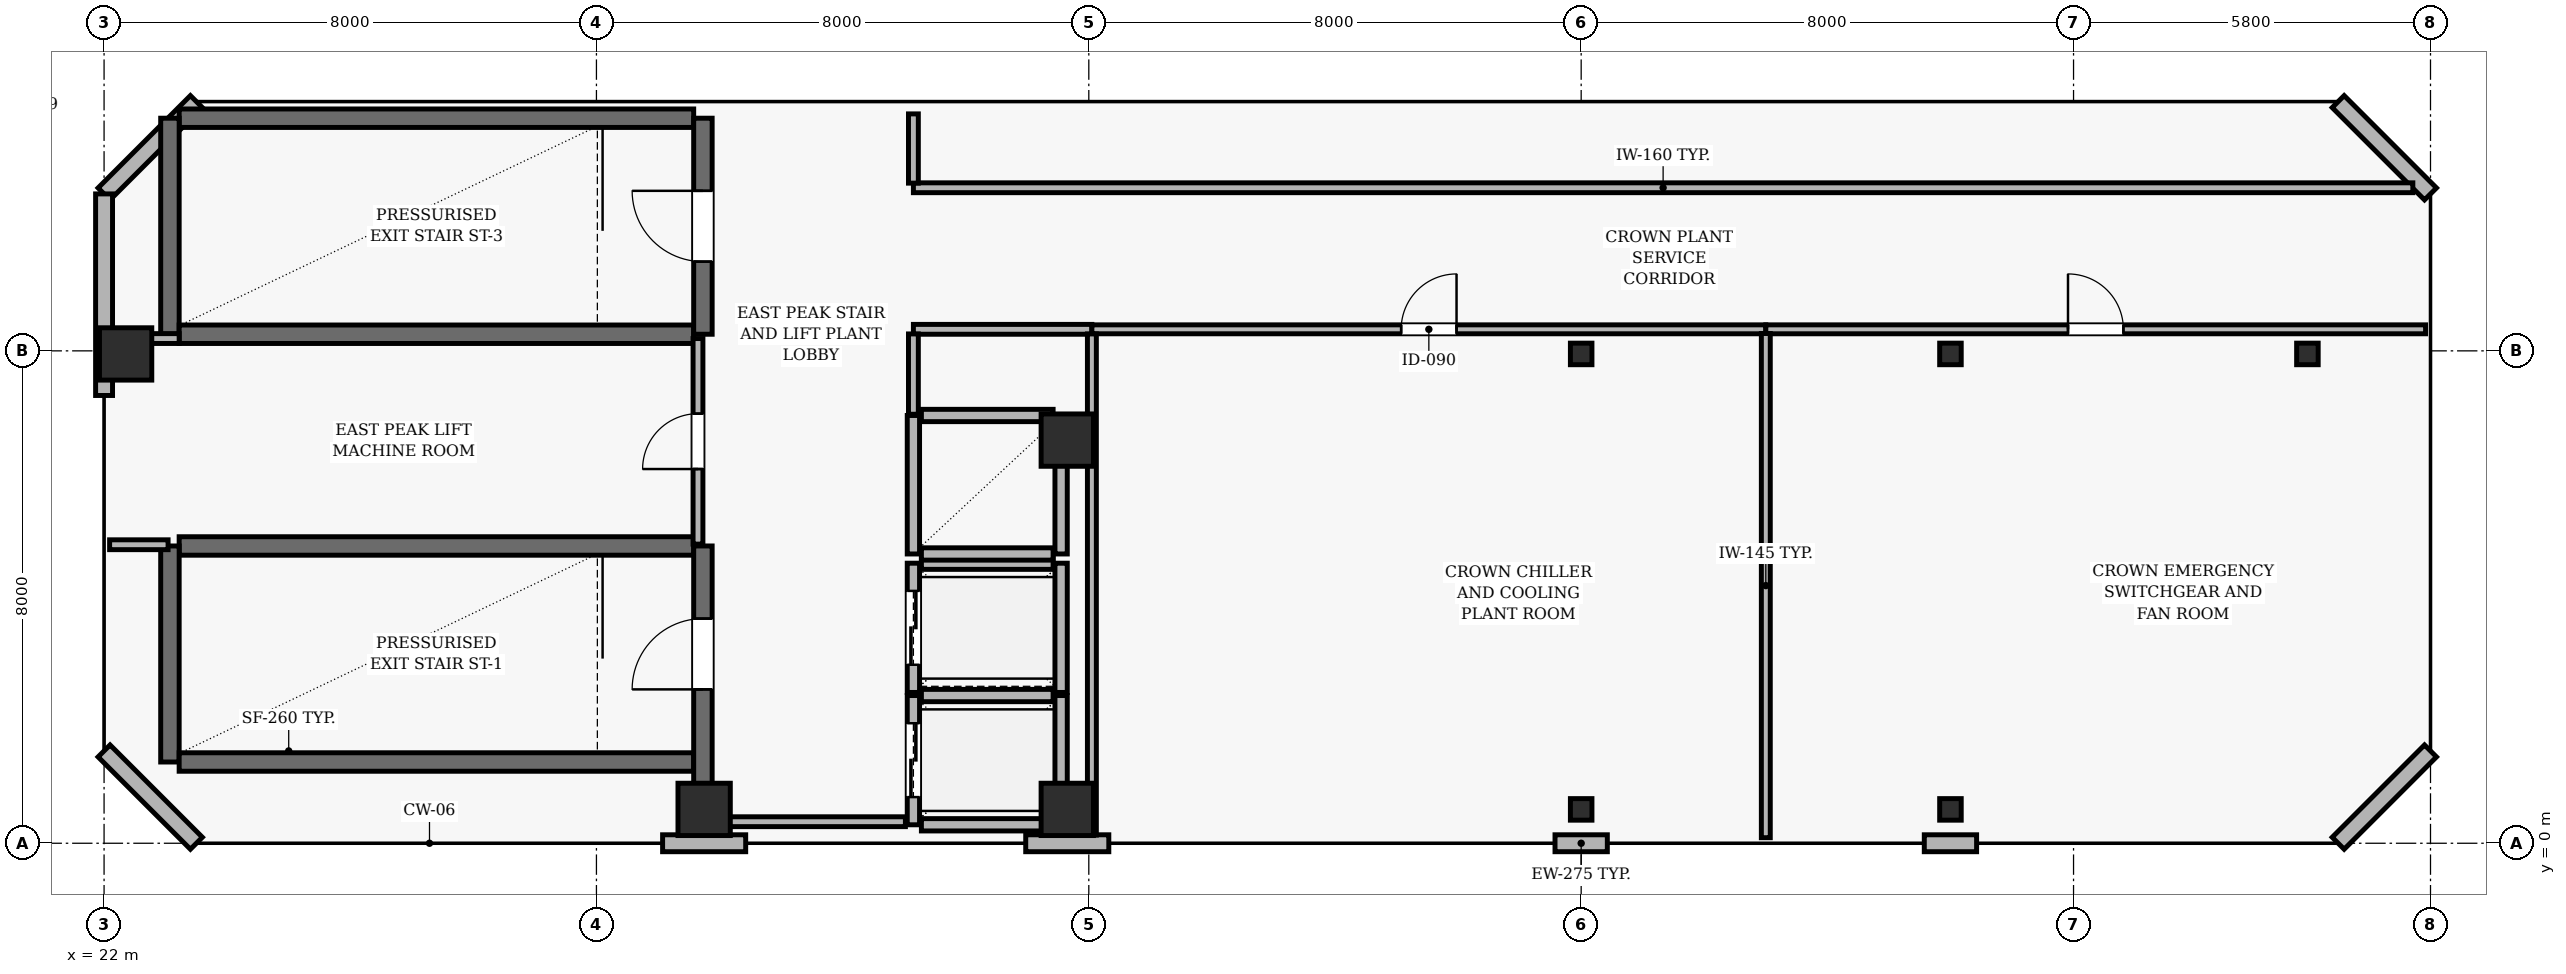
"""IFC4 building model, lengths in metres.
Left out: names, types, materials, properties, quantities, classifications, styles, units other than length and angle.
Written with IfcOpenShell. Run it as: python <this file> out.ifc"""

import sys

from ifc_helpers import new_model, si_unit, direction, frame, frame_2d, origin, origin_2d, place, context, subcontext, project, spatial, rectangle, hollow_rectangle, extrude, element, fill, save


model = new_model("IFC4")
c1 = context("Model", 3, precision=1e-05, world=origin(), true_north=direction((0.0, 1.0)))
c2 = subcontext(c1, "Body", "Model", "MODEL_VIEW")
j1 = project(units=[si_unit("LENGTHUNIT", "METRE"), si_unit("PLANEANGLEUNIT", "RADIAN")], contexts=[c1])
p1 = place(None, origin())
s1 = spatial("IfcSite", under=j1, at=p1, CompositionType="ELEMENT")
p2 = place(p1, origin())
s2 = spatial("IfcBuilding", under=s1, at=p2, CompositionType="ELEMENT")
p3 = place(p2, frame((0.0, 0.0, 321.7)))
s3 = spatial("IfcBuildingStorey", under=s2, at=p3, CompositionType="ELEMENT", Elevation=321.7)
for number, where, z_axis, x_axis in (
    (1, (31.75, 0.55, 0.0), (0.0, 0.0, 1.0), (1.0, 0.0, 0.0)),
    (2, (37.65, 0.55, 0.0), (0.0, 0.0, 1.0), (1.0, 0.0, 0.0)),
    (3, (22.35, 7.95, 0.0), (0.0, 0.0, 1.0), (1.0, 0.0, 0.0)),
    (4, (37.65, 6.55, 0.0), (0.0, 0.0, 1.0), (1.0, 0.0, 0.0)),
):
    element("IfcColumn", number, at=place(p3, frame(where, z_axis=z_axis, x_axis=x_axis)), inside=s3, PredefinedType="COLUMN", context=c2, shape_type="SweptSolid", body=[
        extrude(rectangle(XDim=0.85, YDim=0.85, at=origin_2d()), origin(), (0.0, 0.0, 1.0), 5.0),
    ])
for number, where, z_axis, x_axis in (
    (5, (46.0, 0.55, 0.0), (0.0, 0.0, 1.0), (1.0, 0.0, 0.0)),
    (6, (46.0, 7.95, 0.0), (0.0, 0.0, 1.0), (1.0, 0.0, 0.0)),
    (7, (52.0, 0.55, 0.0), (0.0, 0.0, 1.0), (1.0, 0.0, 0.0)),
    (8, (52.0, 7.95, 0.0), (0.0, 0.0, 1.0), (1.0, 0.0, 0.0)),
    (9, (57.8, 7.95, 0.0), (0.0, 0.0, 1.0), (1.0, 0.0, 0.0)),
):
    element("IfcColumn", number, at=place(p3, frame(where, z_axis=z_axis, x_axis=x_axis)), inside=s3, PredefinedType="COLUMN", context=c2, shape_type="SweptSolid", body=[
        extrude(hollow_rectangle(XDim=0.35, YDim=0.35, WallThickness=0.016, at=origin_2d()), origin(), (0.0, 0.0, 1.0), 5.0),
    ])
p4 = place(p3, frame((31.075, 0.0, 0.0), z_axis=(0.0, 0.0, 1.0), x_axis=(1.0, 0.0, 0.0)))
e10 = element("IfcWall", 10, at=p4, inside=s3, PredefinedType="SOLIDWALL", context=c2, shape_type="SweptSolid", body=[
    extrude(rectangle(XDim=1.35, YDim=0.275, at=frame_2d((0.675, 0.0))), origin(), (0.0, 0.0, 1.0), 4.76),
])
p5 = place(p3, frame((36.975, 0.0, 0.0), z_axis=(0.0, 0.0, 1.0), x_axis=(1.0, 0.0, 0.0)))
e11 = element("IfcWall", 11, at=p5, inside=s3, PredefinedType="SOLIDWALL", context=c2, shape_type="SweptSolid", body=[
    extrude(rectangle(XDim=1.35, YDim=0.275, at=frame_2d((0.675, 0.0))), origin(), (0.0, 0.0, 1.0), 4.76),
])
for number, where, z_axis, x_axis in (
    (12, (45.575, 0.0, 0.0), (0.0, 0.0, 1.0), (1.0, 0.0, 0.0)),
    (13, (51.575, 0.0, 0.0), (0.0, 0.0, 1.0), (1.0, 0.0, 0.0)),
):
    element("IfcWall", number, at=place(p3, frame(where, z_axis=z_axis, x_axis=x_axis)), inside=s3, PredefinedType="SOLIDWALL", context=c2, shape_type="SweptSolid", body=[
        extrude(rectangle(XDim=0.85, YDim=0.275, at=frame_2d((0.425, 0.0))), origin(), (0.0, 0.0, 1.0), 4.76),
    ])
for number, where, z_axis, x_axis in (
    (14, (58.3, 0.0, 0.0), (0.0, 0.0, 1.0), (0.707, 0.707, 0.0)),
    (15, (59.8, 10.55, 0.0), (0.0, 0.0, 1.0), (-0.707, 0.707, 0.0)),
    (16, (23.5, 12.05, 0.0), (0.0, 0.0, 1.0), (-0.707, -0.707, 0.0)),
):
    element("IfcWall", number, at=place(p3, frame(where, z_axis=z_axis, x_axis=x_axis)), inside=s3, PredefinedType="SOLIDWALL", context=c2, shape_type="SweptSolid", body=[
        extrude(rectangle(XDim=2.121, YDim=0.275, at=frame_2d((1.061, 0.0))), origin(), (0.0, 0.0, 1.0), 4.76),
    ])
p6 = place(p3, frame((22.0, 10.55, 0.0), z_axis=(0.0, 0.0, 1.0), x_axis=(0.0, -1.0, 0.0)))
e17 = element("IfcWall", 17, at=p6, inside=s3, PredefinedType="SOLIDWALL", context=c2, shape_type="SweptSolid", body=[
    extrude(rectangle(XDim=3.275, YDim=0.275, at=frame_2d((1.638, 0.0))), origin(), (0.0, 0.0, 1.0), 4.76),
])
p7 = place(p3, frame((22.0, 1.5, 0.0), z_axis=(0.0, 0.0, 1.0), x_axis=(0.707106781187, -0.707106781187, 0.0)))
e18 = element("IfcWall", 18, at=p7, inside=s3, PredefinedType="SOLIDWALL", context=c2, shape_type="SweptSolid", body=[
    extrude(rectangle(XDim=2.121, YDim=0.275, at=frame_2d((1.061, 0.0))), origin(), (0.0, 0.0, 1.0), 4.76),
])
p8 = place(p3, frame((31.58, 4.83, 0.0), z_axis=(0.0, 0.0, 1.0), x_axis=(-1.0, 0.0, 0.0)))
e19 = element("IfcWall", 19, at=p8, inside=s3, PredefinedType="SHEAR", context=c2, shape_type="SweptSolid", body=[
    extrude(rectangle(XDim=8.36, YDim=0.3, at=frame_2d((4.18, 0.0))), origin(), (0.0, 0.0, 1.0), 4.76),
])
p9 = place(p3, frame((23.07, 4.83, 0.0), z_axis=(0.0, 0.0, 1.0), x_axis=(0.0, -1.0, 0.0)))
e20 = element("IfcWall", 20, at=p9, inside=s3, PredefinedType="SHEAR", context=c2, shape_type="SweptSolid", body=[
    extrude(rectangle(XDim=3.51, YDim=0.3, at=frame_2d((1.755, 0.0))), origin(), (0.0, 0.0, 1.0), 4.76),
])
p10 = place(p3, frame((23.22, 1.32, 0.0), z_axis=(0.0, 0.0, 1.0), x_axis=(1.0, 0.0, 0.0)))
e21 = element("IfcWall", 21, at=p10, inside=s3, PredefinedType="SHEAR", context=c2, shape_type="SweptSolid", body=[
    extrude(rectangle(XDim=8.36, YDim=0.3, at=frame_2d((4.18, 0.0))), origin(), (0.0, 0.0, 1.0), 4.76),
])
p11 = place(p3, frame((31.73, 0.96, 0.0), z_axis=(0.0, 0.0, 1.0), x_axis=(0.0, 1.0, 0.0)))
e22 = element("IfcWall", 22, at=p11, inside=s3, PredefinedType="SHEAR", context=c2, shape_type="SweptSolid", body=[
    extrude(rectangle(XDim=3.87, YDim=0.3, at=frame_2d((1.935, 0.0))), origin(), (0.0, 0.0, 1.0), 4.76),
])
p12 = place(p11, frame((1.54, 0.0, 0.0)))
e23 = element("IfcOpeningElement", 23, at=p12, cuts=e22, PredefinedType="OPENING", context=c2, shape_type="SweptSolid", body=[
    extrude(rectangle(XDim=1.15, YDim=2.15, at=frame_2d((0.575, 1.075))), frame((0.0, 0.16, 0.0), z_axis=(0.0, -1.0, 0.0), x_axis=(1.0, 0.0, 0.0)), (0.0, 0.0, 1.0), 0.32),
])
p13 = place(p3, frame((31.58, 11.78, 0.0), z_axis=(0.0, 0.0, 1.0), x_axis=(-1.0, 0.0, 0.0)))
e24 = element("IfcWall", 24, at=p13, inside=s3, PredefinedType="SHEAR", context=c2, shape_type="SweptSolid", body=[
    extrude(rectangle(XDim=8.36, YDim=0.3, at=frame_2d((4.18, 0.0))), origin(), (0.0, 0.0, 1.0), 4.76),
])
p14 = place(p3, frame((23.07, 11.78, 0.0), z_axis=(0.0, 0.0, 1.0), x_axis=(0.0, -1.0, 0.0)))
e25 = element("IfcWall", 25, at=p14, inside=s3, PredefinedType="SHEAR", context=c2, shape_type="SweptSolid", body=[
    extrude(rectangle(XDim=3.51, YDim=0.3, at=frame_2d((1.755, 0.0))), origin(), (0.0, 0.0, 1.0), 4.76),
])
p15 = place(p3, frame((23.22, 8.27, 0.0), z_axis=(0.0, 0.0, 1.0), x_axis=(1.0, 0.0, 0.0)))
e26 = element("IfcWall", 26, at=p15, inside=s3, PredefinedType="SHEAR", context=c2, shape_type="SweptSolid", body=[
    extrude(rectangle(XDim=8.36, YDim=0.3, at=frame_2d((4.18, 0.0))), origin(), (0.0, 0.0, 1.0), 4.76),
])
p16 = place(p3, frame((31.73, 8.27, 0.0), z_axis=(0.0, 0.0, 1.0), x_axis=(0.0, 1.0, 0.0)))
e27 = element("IfcWall", 27, at=p16, inside=s3, PredefinedType="SHEAR", context=c2, shape_type="SweptSolid", body=[
    extrude(rectangle(XDim=3.51, YDim=0.3, at=frame_2d((1.755, 0.0))), origin(), (0.0, 0.0, 1.0), 4.76),
])
p17 = place(p16, frame((1.18, 0.0, 0.0)))
e28 = element("IfcOpeningElement", 28, at=p17, cuts=e27, PredefinedType="OPENING", context=c2, shape_type="SweptSolid", body=[
    extrude(rectangle(XDim=1.15, YDim=2.15, at=frame_2d((0.575, 1.075))), frame((0.0, 0.16, 0.0), z_axis=(0.0, -1.0, 0.0), x_axis=(1.0, 0.0, 0.0)), (0.0, 0.0, 1.0), 0.32),
])
p18 = place(p3, frame((35.15, 2.4, 0.0), z_axis=(0.0, 0.0, 1.0), x_axis=(0.0, -1.0, 0.0)))
e29 = element("IfcWall", 29, at=p18, inside=s3, PredefinedType="SOLIDWALL", context=c2, shape_type="SweptSolid", body=[
    extrude(rectangle(XDim=2.1, YDim=0.2, at=frame_2d((1.05, 0.0))), origin(), (0.0, 0.0, 1.0), 4.76),
])
p19 = place(p18, frame((0.45, 0.0, 0.0)))
e30 = element("IfcOpeningElement", 30, at=p19, cuts=e29, PredefinedType="OPENING", context=c2, shape_type="SweptSolid", body=[
    extrude(rectangle(XDim=1.2, YDim=2.15, at=frame_2d((0.6, 1.075))), frame((0.0, 0.11, 0.0), z_axis=(0.0, -1.0, 0.0), x_axis=(1.0, 0.0, 0.0)), (0.0, 0.0, 1.0), 0.22),
])
p20 = place(p3, frame((37.55, 0.3, 0.0), z_axis=(0.0, 0.0, 1.0), x_axis=(0.0, 1.0, 0.0)))
e31 = element("IfcWall", 31, at=p20, inside=s3, PredefinedType="SOLIDWALL", context=c2, shape_type="SweptSolid", body=[
    extrude(rectangle(XDim=2.1, YDim=0.2, at=frame_2d((1.05, 0.0))), origin(), (0.0, 0.0, 1.0), 4.76),
])
for number, where, z_axis, x_axis in (
    (32, (35.28, 0.3, 0.0), (0.0, 0.0, 1.0), (1.0, 0.0, 0.0)),
    (33, (37.42, 2.4, 0.0), (0.0, 0.0, 1.0), (-1.0, 0.0, 0.0)),
):
    element("IfcWall", number, at=place(p3, frame(where, z_axis=z_axis, x_axis=x_axis)), inside=s3, PredefinedType="SOLIDWALL", context=c2, shape_type="SweptSolid", body=[
        extrude(rectangle(XDim=2.14, YDim=0.2, at=frame_2d((1.07, 0.0))), origin(), (0.0, 0.0, 1.0), 4.76),
    ])
p21 = place(p3, frame((35.15, 4.55, 0.0), z_axis=(0.0, 0.0, 1.0), x_axis=(0.0, -1.0, 0.0)))
e34 = element("IfcWall", 34, at=p21, inside=s3, PredefinedType="SOLIDWALL", context=c2, shape_type="SweptSolid", body=[
    extrude(rectangle(XDim=2.1, YDim=0.2, at=frame_2d((1.05, 0.0))), origin(), (0.0, 0.0, 1.0), 4.76),
])
p22 = place(p21, frame((0.45, 0.0, 0.0)))
e35 = element("IfcOpeningElement", 35, at=p22, cuts=e34, PredefinedType="OPENING", context=c2, shape_type="SweptSolid", body=[
    extrude(rectangle(XDim=1.2, YDim=2.15, at=frame_2d((0.6, 1.075))), frame((0.0, 0.11, 0.0), z_axis=(0.0, -1.0, 0.0), x_axis=(1.0, 0.0, 0.0)), (0.0, 0.0, 1.0), 0.22),
])
p23 = place(p3, frame((37.55, 2.45, 0.0), z_axis=(0.0, 0.0, 1.0), x_axis=(0.0, 1.0, 0.0)))
e36 = element("IfcWall", 36, at=p23, inside=s3, PredefinedType="SOLIDWALL", context=c2, shape_type="SweptSolid", body=[
    extrude(rectangle(XDim=2.1, YDim=0.2, at=frame_2d((1.05, 0.0))), origin(), (0.0, 0.0, 1.0), 4.76),
])
p24 = place(p3, frame((37.42, 4.55, 0.0), z_axis=(0.0, 0.0, 1.0), x_axis=(-1.0, 0.0, 0.0)))
e37 = element("IfcWall", 37, at=p24, inside=s3, PredefinedType="SOLIDWALL", context=c2, shape_type="SweptSolid", body=[
    extrude(rectangle(XDim=2.14, YDim=0.2, at=frame_2d((1.07, 0.0))), origin(), (0.0, 0.0, 1.0), 4.76),
])
for number, where, z_axis, x_axis in (
    (38, (35.15, 6.95, 0.0), (0.0, 0.0, 1.0), (0.0, -1.0, 0.0)),
    (39, (37.55, 4.7, 0.0), (0.0, 0.0, 1.0), (0.0, 1.0, 0.0)),
):
    element("IfcWall", number, at=place(p3, frame(where, z_axis=z_axis, x_axis=x_axis)), inside=s3, PredefinedType="SOLIDWALL", context=c2, shape_type="SweptSolid", body=[
        extrude(rectangle(XDim=2.25, YDim=0.2, at=frame_2d((1.125, 0.0))), origin(), (0.0, 0.0, 1.0), 4.76),
    ])
for number, where, z_axis, x_axis in (
    (40, (35.28, 4.7, 0.0), (0.0, 0.0, 1.0), (1.0, 0.0, 0.0)),
    (41, (37.42, 6.95, 0.0), (0.0, 0.0, 1.0), (-1.0, 0.0, 0.0)),
):
    element("IfcWall", number, at=place(p3, frame(where, z_axis=z_axis, x_axis=x_axis)), inside=s3, PredefinedType="SOLIDWALL", context=c2, shape_type="SweptSolid", body=[
        extrude(rectangle(XDim=2.14, YDim=0.2, at=frame_2d((1.07, 0.0))), origin(), (0.0, 0.0, 1.0), 4.76),
    ])
p25 = place(p3, frame((22.09, 4.85, 0.0), z_axis=(0.0, 0.0, 1.0), x_axis=(1.0, 0.0, 0.0)))
e42 = element("IfcWall", 42, at=p25, inside=s3, PredefinedType="PARTITIONING", context=c2, shape_type="SweptSolid", body=[
    extrude(rectangle(XDim=0.95, YDim=0.16, at=frame_2d((0.475, 0.0))), origin(), (0.0, 0.0, 1.0), 4.76),
])
p26 = place(p3, frame((23.22, 8.2, 0.0), z_axis=(0.0, 0.0, 1.0), x_axis=(-1.0, 0.0, 0.0)))
e43 = element("IfcWall", 43, at=p26, inside=s3, PredefinedType="PARTITIONING", context=c2, shape_type="SweptSolid", body=[
    extrude(rectangle(XDim=1.087, YDim=0.16, at=frame_2d((0.543, 0.0))), origin(), (0.0, 0.0, 1.0), 4.291),
])
p27 = place(p3, frame((31.65, 0.35, 0.0), z_axis=(0.0, 0.0, 1.0), x_axis=(1.0, 0.0, 0.0)))
e44 = element("IfcWall", 44, at=p27, inside=s3, PredefinedType="PARTITIONING", context=c2, shape_type="SweptSolid", body=[
    extrude(rectangle(XDim=3.37, YDim=0.16, at=frame_2d((1.685, 0.0))), origin(), (0.0, 0.0, 1.0), 3.86),
])
p28 = place(p3, frame((35.15, 8.35, 0.0), z_axis=(0.0, 0.0, 1.0), x_axis=(1.0, 0.0, 0.0)))
e45 = element("IfcWall", 45, at=p28, inside=s3, PredefinedType="PARTITIONING", context=c2, shape_type="SweptSolid", body=[
    extrude(rectangle(XDim=2.9, YDim=0.16, at=frame_2d((1.45, 0.0))), origin(), (0.0, 0.0, 1.0), 4.291),
])
p29 = place(p3, frame((38.05, 8.35, 0.0), z_axis=(0.0, 0.0, 1.0), x_axis=(1.0, 0.0, 0.0)))
e46 = element("IfcWall", 46, at=p29, inside=s3, PredefinedType="PARTITIONING", context=c2, shape_type="SweptSolid", body=[
    extrude(rectangle(XDim=10.95, YDim=0.145, at=frame_2d((5.475, 0.0))), origin(), (0.0, 0.0, 1.0), 4.291),
])
p30 = place(p29, frame((5.025, 0.0, 0.0)))
e47 = element("IfcOpeningElement", 47, at=p30, cuts=e46, PredefinedType="OPENING", context=c2, shape_type="SweptSolid", body=[
    extrude(rectangle(XDim=0.9, YDim=2.1, at=frame_2d((0.45, 1.05))), frame((0.0, 0.083, 0.0), z_axis=(0.0, -1.0, 0.0), x_axis=(1.0, 0.0, 0.0)), (0.0, 0.0, 1.0), 0.165),
])
p31 = place(p3, frame((49.0, 8.35, 0.0), z_axis=(0.0, 0.0, 1.0), x_axis=(1.0, 0.0, 0.0)))
e48 = element("IfcWall", 48, at=p31, inside=s3, PredefinedType="PARTITIONING", context=c2, shape_type="SweptSolid", body=[
    extrude(rectangle(XDim=10.72, YDim=0.145, at=frame_2d((5.36, 0.0))), origin(), (0.0, 0.0, 1.0), 4.291),
])
p32 = place(p31, frame((4.91, 0.0, 0.0)))
e49 = element("IfcOpeningElement", 49, at=p32, cuts=e48, PredefinedType="OPENING", context=c2, shape_type="SweptSolid", body=[
    extrude(rectangle(XDim=0.9, YDim=2.1, at=frame_2d((0.45, 1.05))), frame((0.0, 0.083, 0.0), z_axis=(0.0, -1.0, 0.0), x_axis=(1.0, 0.0, 0.0)), (0.0, 0.0, 1.0), 0.165),
])
p33 = place(p3, frame((59.513, 10.65, 0.0), z_axis=(0.0, 0.0, 1.0), x_axis=(-1.0, 0.0, 0.0)))
e50 = element("IfcWall", 50, at=p33, inside=s3, PredefinedType="PARTITIONING", context=c2, shape_type="SweptSolid", body=[
    extrude(rectangle(XDim=24.363, YDim=0.16, at=frame_2d((12.182, 0.0))), origin(), (0.0, 0.0, 1.0), 4.76),
])
p34 = place(p3, frame((31.65, 4.86, 0.0), z_axis=(0.0, 0.0, 1.0), x_axis=(0.0, 1.0, 0.0)))
e51 = element("IfcWall", 51, at=p34, inside=s3, PredefinedType="PARTITIONING", context=c2, shape_type="SweptSolid", body=[
    extrude(rectangle(XDim=3.34, YDim=0.16, at=frame_2d((1.67, 0.0))), origin(), (0.0, 0.0, 1.0), 4.76),
])
p35 = place(p34, frame((1.22, 0.0, 0.0)))
e52 = element("IfcOpeningElement", 52, at=p35, cuts=e51, PredefinedType="OPENING", context=c2, shape_type="SweptSolid", body=[
    extrude(rectangle(XDim=0.9, YDim=2.1, at=frame_2d((0.45, 1.05))), frame((0.0, 0.09, 0.0), z_axis=(0.0, -1.0, 0.0), x_axis=(1.0, 0.0, 0.0)), (0.0, 0.0, 1.0), 0.18),
])
p36 = place(p3, frame((35.15, 6.97, 0.0), z_axis=(0.0, 0.0, 1.0), x_axis=(0.0, 1.0, 0.0)))
e53 = element("IfcWall", 53, at=p36, inside=s3, PredefinedType="PARTITIONING", context=c2, shape_type="SweptSolid", body=[
    extrude(rectangle(XDim=1.305, YDim=0.16, at=frame_2d((0.652, 0.0))), origin(), (0.0, 0.0, 1.0), 4.76),
])
p37 = place(p3, frame((35.15, 10.725, 0.0), z_axis=(0.0, 0.0, 1.0), x_axis=(0.0, 1.0, 0.0)))
e54 = element("IfcWall", 54, at=p37, inside=s3, PredefinedType="PARTITIONING", context=c2, shape_type="SweptSolid", body=[
    extrude(rectangle(XDim=1.125, YDim=0.16, at=frame_2d((0.562, 0.0))), origin(), (0.0, 0.0, 1.0), 4.76),
])
p38 = place(p3, frame((38.05, 8.275, 0.0), z_axis=(0.0, 0.0, 1.0), x_axis=(0.0, -1.0, 0.0)))
e55 = element("IfcWall", 55, at=p38, inside=s3, PredefinedType="PARTITIONING", context=c2, shape_type="SweptSolid", body=[
    extrude(rectangle(XDim=8.142, YDim=0.145, at=frame_2d((4.071, 0.0))), origin(), (0.0, 0.0, 1.0), 4.291),
])
p39 = place(p3, frame((49.0, 0.09, 0.0), z_axis=(0.0, 0.0, 1.0), x_axis=(0.0, 1.0, 0.0)))
e56 = element("IfcWall", 56, at=p39, inside=s3, PredefinedType="PARTITIONING", context=c2, shape_type="SweptSolid", body=[
    extrude(rectangle(XDim=8.192, YDim=0.145, at=frame_2d((4.096, 0.0))), origin(), (0.0, 0.0, 1.0), 4.76),
])
p40 = place(p12, origin())
e57 = element("IfcDoor", 57, at=p40, inside=s3, OperationType="SINGLE_SWING_LEFT", PredefinedType="DOOR", context=c2, shape_type="SweptSolid", body=[
    extrude(rectangle(XDim=1.15, YDim=2.15, at=frame_2d((0.575, 1.075))), frame((0.0, 0.025, 0.0), z_axis=(0.0, -1.0, 0.0), x_axis=(1.0, 0.0, 0.0)), (0.0, 0.0, 1.0), 0.05),
])
fill(e23, e57)
p41 = place(p17, origin())
e58 = element("IfcDoor", 58, at=p41, inside=s3, OperationType="SINGLE_SWING_RIGHT", PredefinedType="DOOR", context=c2, shape_type="SweptSolid", body=[
    extrude(rectangle(XDim=1.15, YDim=2.15, at=frame_2d((0.575, 1.075))), frame((0.0, 0.025, 0.0), z_axis=(0.0, -1.0, 0.0), x_axis=(1.0, 0.0, 0.0)), (0.0, 0.0, 1.0), 0.05),
])
fill(e28, e58)
p42 = place(p19, origin())
e59 = element("IfcDoor", 59, at=p42, inside=s3, OperationType="DOUBLE_DOOR_SLIDING", PredefinedType="DOOR", context=c2, shape_type="SweptSolid", body=[
    extrude(rectangle(XDim=1.2, YDim=2.15, at=frame_2d((0.6, 1.075))), frame((0.0, 0.025, 0.0), z_axis=(0.0, -1.0, 0.0), x_axis=(1.0, 0.0, 0.0)), (0.0, 0.0, 1.0), 0.05),
])
fill(e30, e59)
p43 = place(p22, origin())
e60 = element("IfcDoor", 60, at=p43, inside=s3, OperationType="DOUBLE_DOOR_SLIDING", PredefinedType="DOOR", context=c2, shape_type="SweptSolid", body=[
    extrude(rectangle(XDim=1.2, YDim=2.15, at=frame_2d((0.6, 1.075))), frame((0.0, 0.025, 0.0), z_axis=(0.0, -1.0, 0.0), x_axis=(1.0, 0.0, 0.0)), (0.0, 0.0, 1.0), 0.05),
])
fill(e35, e60)
p44 = place(p35, origin())
e61 = element("IfcDoor", 61, at=p44, inside=s3, OperationType="SINGLE_SWING_LEFT", PredefinedType="DOOR", context=c2, shape_type="SweptSolid", body=[
    extrude(rectangle(XDim=0.9, YDim=2.1, at=frame_2d((0.45, 1.05))), frame((0.0, 0.025, 0.0), z_axis=(0.0, -1.0, 0.0), x_axis=(1.0, 0.0, 0.0)), (0.0, 0.0, 1.0), 0.05),
])
fill(e52, e61)
p45 = place(p30, origin())
e62 = element("IfcDoor", 62, at=p45, inside=s3, OperationType="SINGLE_SWING_RIGHT", PredefinedType="DOOR", context=c2, shape_type="SweptSolid", body=[
    extrude(rectangle(XDim=0.9, YDim=2.1, at=frame_2d((0.45, 1.05))), frame((0.0, 0.025, 0.0), z_axis=(0.0, -1.0, 0.0), x_axis=(1.0, 0.0, 0.0)), (0.0, 0.0, 1.0), 0.05),
])
fill(e47, e62)
p46 = place(p32, origin())
e63 = element("IfcDoor", 63, at=p46, inside=s3, OperationType="SINGLE_SWING_LEFT", PredefinedType="DOOR", context=c2, shape_type="SweptSolid", body=[
    extrude(rectangle(XDim=0.9, YDim=2.1, at=frame_2d((0.45, 1.05))), frame((0.0, 0.025, 0.0), z_axis=(0.0, -1.0, 0.0), x_axis=(1.0, 0.0, 0.0)), (0.0, 0.0, 1.0), 0.05),
])
fill(e49, e63)
save(model, sys.argv[1])
